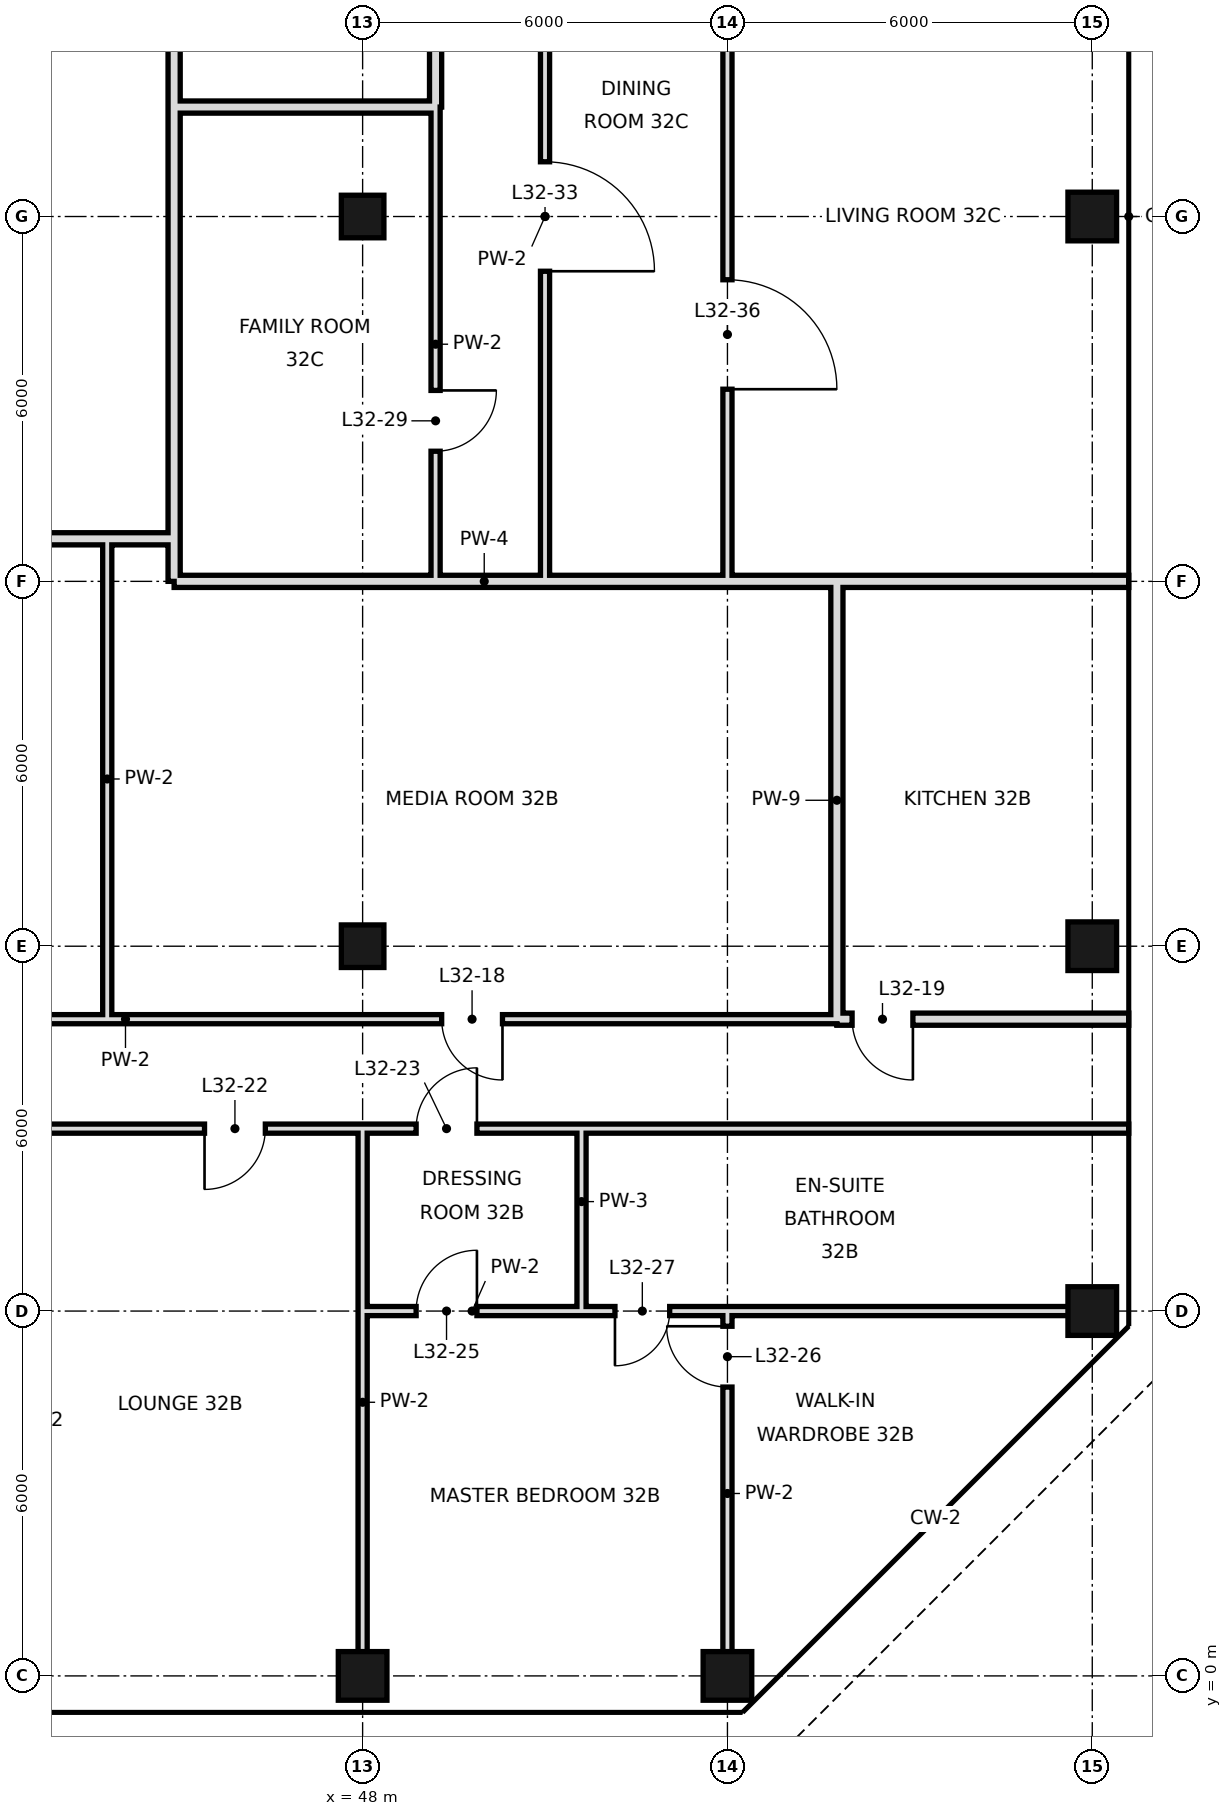
"""IFC4 building model, lengths in metres.
Left out: names, types, materials, properties, quantities, classifications, styles, units other than length and angle.
Written with IfcOpenShell. Run it as: python <this file> out.ifc"""

import sys

from ifc_helpers import new_model, si_unit, direction, frame, frame_2d, origin, origin_2d, place, context, subcontext, project, spatial, rectangle, hollow_rectangle, extrude, element, fill, save


model = new_model("IFC4")
c1 = context("Model", 3, precision=1e-05, world=origin(), true_north=direction((0.0, 1.0)))
c2 = subcontext(c1, "Body", "Model", "MODEL_VIEW")
j1 = project(units=[si_unit("LENGTHUNIT", "METRE"), si_unit("PLANEANGLEUNIT", "RADIAN")], contexts=[c1])
p1 = place(None, origin())
s1 = spatial("IfcSite", under=j1, at=p1, CompositionType="ELEMENT")
p2 = place(p1, origin())
s2 = spatial("IfcBuilding", under=s1, at=p2, CompositionType="ELEMENT")
p3 = place(p2, frame((0.0, 0.0, 143.8)))
s3 = spatial("IfcBuildingStorey", under=s2, at=p3, CompositionType="ELEMENT", Elevation=143.8)
p4 = place(p3, frame((48.0, 0.0, 0.0), z_axis=(0.0, 0.0, 1.0), x_axis=(1.0, 0.0, 0.0)))
e1 = element("IfcColumn", 1, at=p4, inside=s3, PredefinedType="COLUMN", context=c2, shape_type="SweptSolid", body=[
    extrude(hollow_rectangle(XDim=0.8, YDim=0.8, WallThickness=0.04, at=origin_2d()), origin(), (0.0, 0.0, 1.0), 3.6),
])
for number, where, z_axis, x_axis in (
    (2, (48.0, 12.0, 0.0), (0.0, 0.0, 1.0), (1.0, 0.0, 0.0)),
    (3, (48.0, 24.0, 0.0), (0.0, 0.0, 1.0), (1.0, 0.0, 0.0)),
):
    element("IfcColumn", number, at=place(p3, frame(where, z_axis=z_axis, x_axis=x_axis)), inside=s3, PredefinedType="COLUMN", context=c2, shape_type="SweptSolid", body=[
        extrude(hollow_rectangle(XDim=0.7, YDim=0.7, WallThickness=0.036, at=origin_2d()), origin(), (0.0, 0.0, 1.0), 3.6),
    ])
for number, where, z_axis, x_axis in (
    (4, (54.0, 0.0, 0.0), (0.0, 0.0, 1.0), (1.0, 0.0, 0.0)),
    (5, (60.0, 6.0, 0.0), (0.0, 0.0, 1.0), (1.0, 0.0, 0.0)),
    (6, (60.0, 12.0, 0.0), (0.0, 0.0, 1.0), (1.0, 0.0, 0.0)),
    (7, (60.0, 24.0, 0.0), (0.0, 0.0, 1.0), (1.0, 0.0, 0.0)),
):
    element("IfcColumn", number, at=place(p3, frame(where, z_axis=z_axis, x_axis=x_axis)), inside=s3, PredefinedType="COLUMN", context=c2, shape_type="SweptSolid", body=[
        extrude(hollow_rectangle(XDim=0.8, YDim=0.8, WallThickness=0.04, at=origin_2d()), origin(), (0.0, 0.0, 1.0), 3.6),
    ])
p5 = place(p3, frame((43.8, 10.8, 0.0), z_axis=(0.0, 0.0, 1.0), x_axis=(0.0, 1.0, 0.0)))
e8 = element("IfcWall", 8, at=p5, inside=s3, PredefinedType="PARTITIONING", context=c2, shape_type="SweptSolid", body=[
    extrude(rectangle(XDim=7.9, YDim=0.15, at=frame_2d((3.95, 0.0))), origin(), (0.0, 0.0, 1.0), 3.42),
])
p6 = place(p3, frame((44.9, 18.7, 0.0), z_axis=(0.0, 0.0, 1.0), x_axis=(0.0, 1.0, 0.0)))
e9 = element("IfcWall", 9, at=p6, inside=s3, PredefinedType="SOLIDWALL", context=c2, shape_type="SweptSolid", body=[
    extrude(rectangle(XDim=7.1, YDim=0.2, at=frame_2d((3.55, 0.0))), origin(), (0.0, 0.0, 1.0), 3.42),
])
p7 = place(p3, frame((44.9, 25.8, 0.0), z_axis=(0.0, 0.0, 1.0), x_axis=(0.0, 1.0, 0.0)))
e10 = element("IfcWall", 10, at=p7, inside=s3, PredefinedType="SOLIDWALL", context=c2, shape_type="SweptSolid", body=[
    extrude(rectangle(XDim=4.8, YDim=0.2, at=frame_2d((2.4, 0.0))), origin(), (0.0, 0.0, 1.0), 2.97),
])
p8 = place(p3, frame((44.9, 18.0, 0.0), z_axis=(0.0, 0.0, 1.0), x_axis=(0.0, 1.0, 0.0)))
e11 = element("IfcWall", 11, at=p8, inside=s3, PredefinedType="SOLIDWALL", context=c2, shape_type="SweptSolid", body=[
    extrude(rectangle(XDim=0.7, YDim=0.2, at=frame_2d((0.35, 0.0))), origin(), (0.0, 0.0, 1.0), 2.97),
])
p9 = place(p3, frame((48.0, 0.0, 0.0), z_axis=(0.0, 0.0, 1.0), x_axis=(0.0, 1.0, 0.0)))
e12 = element("IfcWall", 12, at=p9, inside=s3, PredefinedType="PARTITIONING", context=c2, shape_type="SweptSolid", body=[
    extrude(rectangle(XDim=9.0, YDim=0.15, at=frame_2d((4.5, 0.0))), origin(), (0.0, 0.0, 1.0), 2.72),
])
p10 = place(p3, frame((49.2, 25.8, 0.0), z_axis=(0.0, 0.0, 1.0), x_axis=(0.0, 1.0, 0.0)))
e13 = element("IfcWall", 13, at=p10, inside=s3, PredefinedType="SOLIDWALL", context=c2, shape_type="SweptSolid", body=[
    extrude(rectangle(XDim=4.8, YDim=0.2, at=frame_2d((2.4, 0.0))), origin(), (0.0, 0.0, 1.0), 2.72),
])
p11 = place(p10, frame((2.56, 0.0, 0.0)))
e14 = element("IfcOpeningElement", 14, at=p11, cuts=e13, PredefinedType="OPENING", context=c2, shape_type="SweptSolid", body=[
    extrude(rectangle(XDim=1.0, YDim=2.4, at=frame_2d((0.5, 1.2))), frame((0.0, 0.11, 0.0), z_axis=(0.0, -1.0, 0.0), x_axis=(1.0, 0.0, 0.0)), (0.0, 0.0, 1.0), 0.22),
])
p12 = place(p3, frame((49.2, 18.0, 0.0), z_axis=(0.0, 0.0, 1.0), x_axis=(0.0, 1.0, 0.0)))
e15 = element("IfcWall", 15, at=p12, inside=s3, PredefinedType="PARTITIONING", context=c2, shape_type="SweptSolid", body=[
    extrude(rectangle(XDim=7.8, YDim=0.15, at=frame_2d((3.9, 0.0))), origin(), (0.0, 0.0, 1.0), 3.42),
])
p13 = place(p12, frame((2.14, 0.0, 0.0)))
e16 = element("IfcOpeningElement", 16, at=p13, cuts=e15, PredefinedType="OPENING", context=c2, shape_type="SweptSolid", body=[
    extrude(rectangle(XDim=1.0, YDim=2.4, at=frame_2d((0.5, 1.2))), frame((0.0, 0.085, 0.0), z_axis=(0.0, -1.0, 0.0), x_axis=(1.0, 0.0, 0.0)), (0.0, 0.0, 1.0), 0.17),
])
p14 = place(p3, frame((51.0, 18.0, 0.0), z_axis=(0.0, 0.0, 1.0), x_axis=(0.0, 1.0, 0.0)))
e17 = element("IfcWall", 17, at=p14, inside=s3, PredefinedType="PARTITIONING", context=c2, shape_type="SweptSolid", body=[
    extrude(rectangle(XDim=12.0, YDim=0.15, at=frame_2d((6.0, 0.0))), origin(), (0.0, 0.0, 1.0), 3.42),
])
p15 = place(p14, frame((5.1, 0.0, 0.0)))
e18 = element("IfcOpeningElement", 18, at=p15, cuts=e17, PredefinedType="OPENING", context=c2, shape_type="SweptSolid", body=[
    extrude(rectangle(XDim=1.8, YDim=2.4, at=frame_2d((0.9, 1.2))), frame((0.0, 0.085, 0.0), z_axis=(0.0, -1.0, 0.0), x_axis=(1.0, 0.0, 0.0)), (0.0, 0.0, 1.0), 0.17),
])
p16 = place(p3, frame((51.6, 6.0, 0.0), z_axis=(0.0, 0.0, 1.0), x_axis=(0.0, 1.0, 0.0)))
e19 = element("IfcWall", 19, at=p16, inside=s3, PredefinedType="PARTITIONING", context=c2, shape_type="SweptSolid", body=[
    extrude(rectangle(XDim=3.0, YDim=0.15, at=frame_2d((1.5, 0.0))), origin(), (0.0, 0.0, 1.0), 3.42),
])
p17 = place(p3, frame((54.0, 0.0, 0.0), z_axis=(0.0, 0.0, 1.0), x_axis=(0.0, 1.0, 0.0)))
e20 = element("IfcWall", 20, at=p17, inside=s3, PredefinedType="PARTITIONING", context=c2, shape_type="SweptSolid", body=[
    extrude(rectangle(XDim=6.0, YDim=0.15, at=frame_2d((3.0, 0.0))), origin(), (0.0, 0.0, 1.0), 3.42),
])
p18 = place(p17, frame((4.75, 0.0, 0.0)))
e21 = element("IfcOpeningElement", 21, at=p18, cuts=e20, PredefinedType="OPENING", context=c2, shape_type="SweptSolid", body=[
    extrude(rectangle(XDim=1.0, YDim=2.4, at=frame_2d((0.5, 1.2))), frame((0.0, 0.085, 0.0), z_axis=(0.0, -1.0, 0.0), x_axis=(1.0, 0.0, 0.0)), (0.0, 0.0, 1.0), 0.17),
])
p19 = place(p3, frame((54.0, 18.0, 0.0), z_axis=(0.0, 0.0, 1.0), x_axis=(0.0, 1.0, 0.0)))
e22 = element("IfcWall", 22, at=p19, inside=s3, PredefinedType="PARTITIONING", context=c2, shape_type="SweptSolid", body=[
    extrude(rectangle(XDim=12.0, YDim=0.15, at=frame_2d((6.0, 0.0))), origin(), (0.0, 0.0, 1.0), 3.42),
])
p20 = place(p19, frame((3.16, 0.0, 0.0)))
e23 = element("IfcOpeningElement", 23, at=p20, cuts=e22, PredefinedType="OPENING", context=c2, shape_type="SweptSolid", body=[
    extrude(rectangle(XDim=1.8, YDim=2.4, at=frame_2d((0.9, 1.2))), frame((0.0, 0.085, 0.0), z_axis=(0.0, -1.0, 0.0), x_axis=(1.0, 0.0, 0.0)), (0.0, 0.0, 1.0), 0.17),
])
p21 = place(p3, frame((55.8, 10.8, 0.0), z_axis=(0.0, 0.0, 1.0), x_axis=(0.0, 1.0, 0.0)))
e24 = element("IfcWall", 24, at=p21, inside=s3, PredefinedType="SOLIDWALL", context=c2, shape_type="SweptSolid", body=[
    extrude(rectangle(XDim=7.2, YDim=0.2, at=frame_2d((3.6, 0.0))), origin(), (0.0, 0.0, 1.0), 2.72),
])
p22 = place(p3, frame((55.8, 10.8, 0.0), z_axis=(0.0, 0.0, 1.0), x_axis=(1.0, 0.0, 0.0)))
e25 = element("IfcWall", 25, at=p22, inside=s3, PredefinedType="SOLIDWALL", context=c2, shape_type="SweptSolid", body=[
    extrude(rectangle(XDim=4.8, YDim=0.2, at=frame_2d((2.4, 0.0))), origin(), (0.0, 0.0, 1.0), 2.97),
])
p23 = place(p22, frame((0.25, 0.0, 0.0)))
e26 = element("IfcOpeningElement", 26, at=p23, cuts=e25, PredefinedType="OPENING", context=c2, shape_type="SweptSolid", body=[
    extrude(rectangle(XDim=1.0, YDim=2.4, at=frame_2d((0.5, 1.2))), frame((0.0, 0.11, 0.0), z_axis=(0.0, -1.0, 0.0), x_axis=(1.0, 0.0, 0.0)), (0.0, 0.0, 1.0), 0.22),
])
p24 = place(p3, frame((32.4, 10.8, 0.0), z_axis=(0.0, 0.0, 1.0), x_axis=(1.0, 0.0, 0.0)))
e27 = element("IfcWall", 27, at=p24, inside=s3, PredefinedType="PARTITIONING", context=c2, shape_type="SweptSolid", body=[
    extrude(rectangle(XDim=23.4, YDim=0.15, at=frame_2d((11.7, 0.0))), origin(), (0.0, 0.0, 1.0), 3.42),
])
p25 = place(p24, frame((7.18, 0.0, 0.0)))
e28 = element("IfcOpeningElement", 28, at=p25, cuts=e27, PredefinedType="OPENING", context=c2, shape_type="SweptSolid", body=[
    extrude(rectangle(XDim=1.0, YDim=2.4, at=frame_2d((0.5, 1.2))), frame((0.0, 0.085, 0.0), z_axis=(0.0, -1.0, 0.0), x_axis=(1.0, 0.0, 0.0)), (0.0, 0.0, 1.0), 0.17),
])
p26 = place(p24, frame((16.9, 0.0, 0.0)))
e29 = element("IfcOpeningElement", 29, at=p26, cuts=e27, PredefinedType="OPENING", context=c2, shape_type="SweptSolid", body=[
    extrude(rectangle(XDim=1.0, YDim=2.4, at=frame_2d((0.5, 1.2))), frame((0.0, 0.085, 0.0), z_axis=(0.0, -1.0, 0.0), x_axis=(1.0, 0.0, 0.0)), (0.0, 0.0, 1.0), 0.17),
])
p27 = place(p3, frame((55.8, 18.0, 0.0), z_axis=(0.0, 0.0, 1.0), x_axis=(1.0, 0.0, 0.0)))
e30 = element("IfcWall", 30, at=p27, inside=s3, PredefinedType="SOLIDWALL", context=c2, shape_type="SweptSolid", body=[
    extrude(rectangle(XDim=4.8, YDim=0.2, at=frame_2d((2.4, 0.0))), origin(), (0.0, 0.0, 1.0), 2.72),
])
p28 = place(p3, frame((44.9, 18.0, 0.0), z_axis=(0.0, 0.0, 1.0), x_axis=(1.0, 0.0, 0.0)))
e31 = element("IfcWall", 31, at=p28, inside=s3, PredefinedType="SOLIDWALL", context=c2, shape_type="SweptSolid", body=[
    extrude(rectangle(XDim=10.9, YDim=0.2, at=frame_2d((5.45, 0.0))), origin(), (0.0, 0.0, 1.0), 2.72),
])
p29 = place(p3, frame((3.1, 18.7, 0.0), z_axis=(0.0, 0.0, 1.0), x_axis=(1.0, 0.0, 0.0)))
e32 = element("IfcWall", 32, at=p29, inside=s3, PredefinedType="SOLIDWALL", context=c2, shape_type="SweptSolid", body=[
    extrude(rectangle(XDim=41.8, YDim=0.2, at=frame_2d((20.9, 0.0))), origin(), (0.0, 0.0, 1.0), 2.72),
])
p30 = place(p29, frame((5.64, 0.0, 0.0)))
e33 = element("IfcOpeningElement", 33, at=p30, cuts=e32, PredefinedType="OPENING", context=c2, shape_type="SweptSolid", body=[
    extrude(rectangle(XDim=1.2, YDim=2.4, at=frame_2d((0.6, 1.2))), frame((0.0, 0.11, 0.0), z_axis=(0.0, -1.0, 0.0), x_axis=(1.0, 0.0, 0.0)), (0.0, 0.0, 1.0), 0.22),
])
p31 = place(p29, frame((24.16, 0.0, 0.0)))
e34 = element("IfcOpeningElement", 34, at=p31, cuts=e32, PredefinedType="OPENING", context=c2, shape_type="SweptSolid", body=[
    extrude(rectangle(XDim=1.2, YDim=2.4, at=frame_2d((0.6, 1.2))), frame((0.0, 0.11, 0.0), z_axis=(0.0, -1.0, 0.0), x_axis=(1.0, 0.0, 0.0)), (0.0, 0.0, 1.0), 0.22),
])
p32 = place(p3, frame((44.9, 25.8, 0.0), z_axis=(0.0, 0.0, 1.0), x_axis=(1.0, 0.0, 0.0)))
e35 = element("IfcWall", 35, at=p32, inside=s3, PredefinedType="SOLIDWALL", context=c2, shape_type="SweptSolid", body=[
    extrude(rectangle(XDim=4.3, YDim=0.2, at=frame_2d((2.15, 0.0))), origin(), (0.0, 0.0, 1.0), 2.97),
])
p33 = place(p3, frame((48.0, 6.0, 0.0), z_axis=(0.0, 0.0, 1.0), x_axis=(1.0, 0.0, 0.0)))
e36 = element("IfcWall", 36, at=p33, inside=s3, PredefinedType="PARTITIONING", context=c2, shape_type="SweptSolid", body=[
    extrude(rectangle(XDim=3.6, YDim=0.15, at=frame_2d((1.8, 0.0))), origin(), (0.0, 0.0, 1.0), 2.72),
])
p34 = place(p33, frame((0.88, 0.0, 0.0)))
e37 = element("IfcOpeningElement", 37, at=p34, cuts=e36, PredefinedType="OPENING", context=c2, shape_type="SweptSolid", body=[
    extrude(rectangle(XDim=1.0, YDim=2.4, at=frame_2d((0.5, 1.2))), frame((0.0, 0.085, 0.0), z_axis=(0.0, -1.0, 0.0), x_axis=(1.0, 0.0, 0.0)), (0.0, 0.0, 1.0), 0.17),
])
p35 = place(p3, frame((51.6, 6.0, 0.0), z_axis=(0.0, 0.0, 1.0), x_axis=(1.0, 0.0, 0.0)))
e38 = element("IfcWall", 38, at=p35, inside=s3, PredefinedType="PARTITIONING", context=c2, shape_type="SweptSolid", body=[
    extrude(rectangle(XDim=8.4, YDim=0.15, at=frame_2d((4.2, 0.0))), origin(), (0.0, 0.0, 1.0), 2.72),
])
p36 = place(p35, frame((0.55, 0.0, 0.0)))
e39 = element("IfcOpeningElement", 39, at=p36, cuts=e38, PredefinedType="OPENING", context=c2, shape_type="SweptSolid", body=[
    extrude(rectangle(XDim=0.9, YDim=2.4, at=frame_2d((0.45, 1.2))), frame((0.0, 0.085, 0.0), z_axis=(0.0, -1.0, 0.0), x_axis=(1.0, 0.0, 0.0)), (0.0, 0.0, 1.0), 0.17),
])
p37 = place(p3, frame((24.0, 9.0, 0.0), z_axis=(0.0, 0.0, 1.0), x_axis=(1.0, 0.0, 0.0)))
e40 = element("IfcWall", 40, at=p37, inside=s3, PredefinedType="PARTITIONING", context=c2, shape_type="SweptSolid", body=[
    extrude(rectangle(XDim=27.6, YDim=0.15, at=frame_2d((13.8, 0.0))), origin(), (0.0, 0.0, 1.0), 3.42),
])
p38 = place(p37, frame((3.16, 0.0, 0.0)))
e41 = element("IfcOpeningElement", 41, at=p38, cuts=e40, PredefinedType="OPENING", context=c2, shape_type="SweptSolid", body=[
    extrude(rectangle(XDim=1.8, YDim=2.4, at=frame_2d((0.9, 1.2))), frame((0.0, 0.085, 0.0), z_axis=(0.0, -1.0, 0.0), x_axis=(1.0, 0.0, 0.0)), (0.0, 0.0, 1.0), 0.17),
])
p39 = place(p37, frame((13.6, 0.0, 0.0)))
e42 = element("IfcOpeningElement", 42, at=p39, cuts=e40, PredefinedType="OPENING", context=c2, shape_type="SweptSolid", body=[
    extrude(rectangle(XDim=1.0, YDim=2.4, at=frame_2d((0.5, 1.2))), frame((0.0, 0.085, 0.0), z_axis=(0.0, -1.0, 0.0), x_axis=(1.0, 0.0, 0.0)), (0.0, 0.0, 1.0), 0.17),
])
p40 = place(p37, frame((21.4, 0.0, 0.0)))
e43 = element("IfcOpeningElement", 43, at=p40, cuts=e40, PredefinedType="OPENING", context=c2, shape_type="SweptSolid", body=[
    extrude(rectangle(XDim=1.0, YDim=2.4, at=frame_2d((0.5, 1.2))), frame((0.0, 0.085, 0.0), z_axis=(0.0, -1.0, 0.0), x_axis=(1.0, 0.0, 0.0)), (0.0, 0.0, 1.0), 0.17),
])
p41 = place(p37, frame((24.88, 0.0, 0.0)))
e44 = element("IfcOpeningElement", 44, at=p41, cuts=e40, PredefinedType="OPENING", context=c2, shape_type="SweptSolid", body=[
    extrude(rectangle(XDim=1.0, YDim=2.4, at=frame_2d((0.5, 1.2))), frame((0.0, 0.085, 0.0), z_axis=(0.0, -1.0, 0.0), x_axis=(1.0, 0.0, 0.0)), (0.0, 0.0, 1.0), 0.17),
])
p42 = place(p3, frame((51.6, 9.0, 0.0), z_axis=(0.0, 0.0, 1.0), x_axis=(1.0, 0.0, 0.0)))
e45 = element("IfcWall", 45, at=p42, inside=s3, PredefinedType="PARTITIONING", context=c2, shape_type="SweptSolid", body=[
    extrude(rectangle(XDim=9.0, YDim=0.15, at=frame_2d((4.5, 0.0))), origin(), (0.0, 0.0, 1.0), 3.42),
])
p43 = place(p26, origin())
e46 = element("IfcDoor", 46, at=p43, inside=s3, OperationType="SINGLE_SWING_RIGHT", PredefinedType="DOOR", context=c2, shape_type="SweptSolid", body=[
    extrude(rectangle(XDim=1.0, YDim=2.4, at=frame_2d((0.5, 1.2))), frame((0.0, 0.025, 0.0), z_axis=(0.0, -1.0, 0.0), x_axis=(1.0, 0.0, 0.0)), (0.0, 0.0, 1.0), 0.05),
])
fill(e29, e46)
p44 = place(p23, origin())
e47 = element("IfcDoor", 47, at=p44, inside=s3, OperationType="SINGLE_SWING_RIGHT", PredefinedType="DOOR", context=c2, shape_type="SweptSolid", body=[
    extrude(rectangle(XDim=1.0, YDim=2.4, at=frame_2d((0.5, 1.2))), frame((0.0, 0.025, 0.0), z_axis=(0.0, -1.0, 0.0), x_axis=(1.0, 0.0, 0.0)), (0.0, 0.0, 1.0), 0.05),
])
fill(e26, e47)
p45 = place(p40, frame((1.0, 0.0, 0.0), z_axis=(0.0, 0.0, 1.0), x_axis=(-1.0, 0.0, 0.0)))
e48 = element("IfcDoor", 48, at=p45, inside=s3, OperationType="SINGLE_SWING_RIGHT", PredefinedType="DOOR", context=c2, shape_type="SweptSolid", body=[
    extrude(rectangle(XDim=1.0, YDim=2.4, at=frame_2d((0.5, 1.2))), frame((0.0, 0.025, 0.0), z_axis=(0.0, -1.0, 0.0), x_axis=(1.0, 0.0, 0.0)), (0.0, 0.0, 1.0), 0.05),
])
fill(e43, e48)
p46 = place(p41, frame((1.0, 0.0, 0.0), z_axis=(0.0, 0.0, 1.0), x_axis=(-1.0, 0.0, 0.0)))
e49 = element("IfcDoor", 49, at=p46, inside=s3, OperationType="SINGLE_SWING_LEFT", PredefinedType="DOOR", context=c2, shape_type="SweptSolid", body=[
    extrude(rectangle(XDim=1.0, YDim=2.4, at=frame_2d((0.5, 1.2))), frame((0.0, 0.025, 0.0), z_axis=(0.0, -1.0, 0.0), x_axis=(1.0, 0.0, 0.0)), (0.0, 0.0, 1.0), 0.05),
])
fill(e44, e49)
p47 = place(p34, frame((1.0, 0.0, 0.0), z_axis=(0.0, 0.0, 1.0), x_axis=(-1.0, 0.0, 0.0)))
e50 = element("IfcDoor", 50, at=p47, inside=s3, OperationType="SINGLE_SWING_LEFT", PredefinedType="DOOR", context=c2, shape_type="SweptSolid", body=[
    extrude(rectangle(XDim=1.0, YDim=2.4, at=frame_2d((0.5, 1.2))), frame((0.0, 0.025, 0.0), z_axis=(0.0, -1.0, 0.0), x_axis=(1.0, 0.0, 0.0)), (0.0, 0.0, 1.0), 0.05),
])
fill(e37, e50)
p48 = place(p18, frame((1.0, 0.0, 0.0), z_axis=(0.0, 0.0, 1.0), x_axis=(-1.0, 0.0, 0.0)))
e51 = element("IfcDoor", 51, at=p48, inside=s3, OperationType="SINGLE_SWING_LEFT", PredefinedType="DOOR", context=c2, shape_type="SweptSolid", body=[
    extrude(rectangle(XDim=1.0, YDim=2.4, at=frame_2d((0.5, 1.2))), frame((0.0, 0.025, 0.0), z_axis=(0.0, -1.0, 0.0), x_axis=(1.0, 0.0, 0.0)), (0.0, 0.0, 1.0), 0.05),
])
fill(e21, e51)
p49 = place(p36, frame((0.9, 0.0, 0.0), z_axis=(0.0, 0.0, 1.0), x_axis=(-1.0, 0.0, 0.0)))
e52 = element("IfcDoor", 52, at=p49, inside=s3, OperationType="SINGLE_SWING_RIGHT", PredefinedType="DOOR", context=c2, shape_type="SweptSolid", body=[
    extrude(rectangle(XDim=0.9, YDim=2.4, at=frame_2d((0.45, 1.2))), frame((0.0, 0.025, 0.0), z_axis=(0.0, -1.0, 0.0), x_axis=(1.0, 0.0, 0.0)), (0.0, 0.0, 1.0), 0.05),
])
fill(e39, e52)
p50 = place(p13, origin())
e53 = element("IfcDoor", 53, at=p50, inside=s3, OperationType="SINGLE_SWING_RIGHT", PredefinedType="DOOR", context=c2, shape_type="SweptSolid", body=[
    extrude(rectangle(XDim=1.0, YDim=2.4, at=frame_2d((0.5, 1.2))), frame((0.0, 0.025, 0.0), z_axis=(0.0, -1.0, 0.0), x_axis=(1.0, 0.0, 0.0)), (0.0, 0.0, 1.0), 0.05),
])
fill(e16, e53)
p51 = place(p15, frame((1.8, 0.0, 0.0), z_axis=(0.0, 0.0, 1.0), x_axis=(-1.0, 0.0, 0.0)))
e54 = element("IfcDoor", 54, at=p51, inside=s3, OperationType="SINGLE_SWING_RIGHT", PredefinedType="DOOR", context=c2, shape_type="SweptSolid", body=[
    extrude(rectangle(XDim=1.8, YDim=2.4, at=frame_2d((0.9, 1.2))), frame((0.0, 0.025, 0.0), z_axis=(0.0, -1.0, 0.0), x_axis=(1.0, 0.0, 0.0)), (0.0, 0.0, 1.0), 0.05),
])
fill(e18, e54)
p52 = place(p20, frame((1.8, 0.0, 0.0), z_axis=(0.0, 0.0, 1.0), x_axis=(-1.0, 0.0, 0.0)))
e55 = element("IfcDoor", 55, at=p52, inside=s3, OperationType="SINGLE_SWING_RIGHT", PredefinedType="DOOR", context=c2, shape_type="SweptSolid", body=[
    extrude(rectangle(XDim=1.8, YDim=2.4, at=frame_2d((0.9, 1.2))), frame((0.0, 0.025, 0.0), z_axis=(0.0, -1.0, 0.0), x_axis=(1.0, 0.0, 0.0)), (0.0, 0.0, 1.0), 0.05),
])
fill(e23, e55)
save(model, sys.argv[1])
